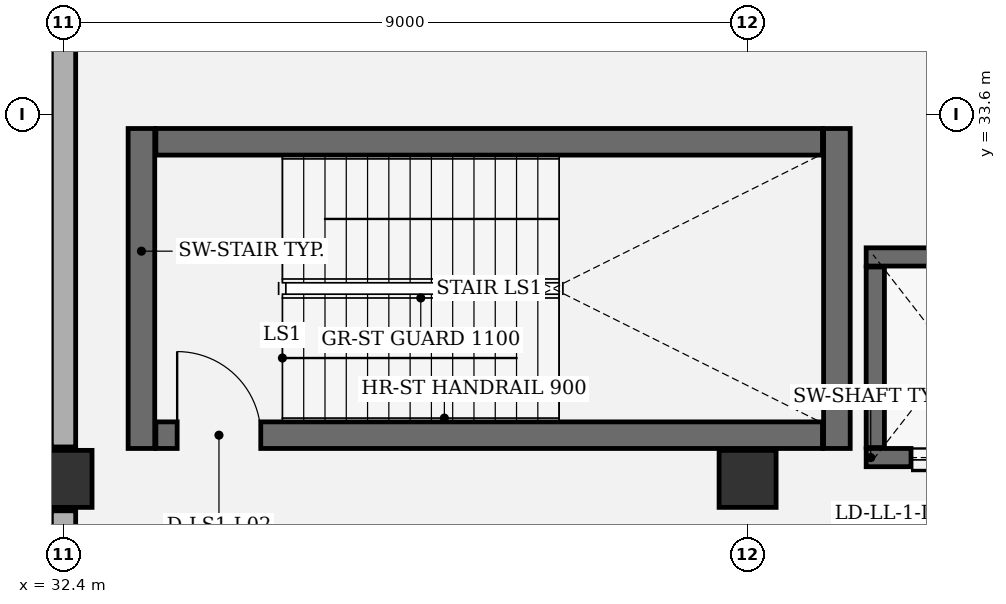
"""IFC4 building model, lengths in metres.
Left out: names, types, materials, properties, quantities, classifications, styles, units other than length and angle.
Written with IfcOpenShell. Run it as: python <this file> out.ifc"""

import sys

from ifc_helpers import new_model, si_unit, direction, frame, frame_2d, origin, origin_2d, place, context, subcontext, project, spatial, rectangle, extrude, element, fill, save


model = new_model("IFC4")
c1 = context("Model", 3, precision=1e-05, world=origin(), true_north=direction((0.0, 1.0)))
c2 = subcontext(c1, "Body", "Model", "MODEL_VIEW")
j1 = project(units=[si_unit("LENGTHUNIT", "METRE"), si_unit("PLANEANGLEUNIT", "RADIAN")], contexts=[c1])
p1 = place(None, origin())
s1 = spatial("IfcSite", under=j1, at=p1, CompositionType="ELEMENT")
p2 = place(p1, origin())
s2 = spatial("IfcBuilding", under=s1, at=p2, CompositionType="ELEMENT")
p3 = place(p2, frame((0.0, 0.0, 12.0)))
s3 = spatial("IfcBuildingStorey", under=s2, at=p3, CompositionType="ELEMENT", Elevation=12.0)
for number, where, z_axis, x_axis in (
    (1, (32.4, 28.8, 0.0), (0.0, 0.0, 1.0), (1.0, 0.0, 0.0)),
    (2, (41.4, 28.8, 0.0), (0.0, 0.0, 1.0), (1.0, 0.0, 0.0)),
):
    element("IfcColumn", number, at=place(p3, frame(where, z_axis=z_axis, x_axis=x_axis)), inside=s3, PredefinedType="COLUMN", context=c2, shape_type="SweptSolid", body=[
        extrude(rectangle(XDim=0.75, YDim=0.75, at=origin_2d()), origin(), (0.0, 0.0, 1.0), 5.0),
    ])
p4 = place(p3, frame((32.4, 19.62, 0.0), z_axis=(0.0, 0.0, 1.0), x_axis=(0.0, 1.0, 0.0)))
e3 = element("IfcWall", 3, at=p4, inside=s3, PredefinedType="SOLIDWALL", context=c2, shape_type="SweptSolid", body=[
    extrude(rectangle(XDim=8.76, YDim=0.32, at=frame_2d((4.38, 0.0))), origin(), (0.0, 0.0, 1.0), 3.937),
])
p5 = place(p3, frame((32.4, 29.22, 0.0), z_axis=(0.0, 0.0, 1.0), x_axis=(0.0, 1.0, 0.0)))
e4 = element("IfcWall", 4, at=p5, inside=s3, PredefinedType="SOLIDWALL", context=c2, shape_type="SweptSolid", body=[
    extrude(rectangle(XDim=8.76, YDim=0.32, at=frame_2d((4.38, 0.0))), origin(), (0.0, 0.0, 1.0), 3.937),
])
for number, where, z_axis, x_axis in (
    (5, (33.425, 33.41, 0.0), (0.0, 0.0, 1.0), (0.0, -1.0, 0.0)),
    (6, (42.575, 29.2, 0.0), (0.0, 0.0, 1.0), (0.0, 1.0, 0.0)),
):
    element("IfcWall", number, at=place(p3, frame(where, z_axis=z_axis, x_axis=x_axis)), inside=s3, PredefinedType="SHEAR", context=c2, shape_type="SweptSolid", body=[
        extrude(rectangle(XDim=4.21, YDim=0.35, at=frame_2d((2.105, 0.0))), origin(), (0.0, 0.0, 1.0), 4.995),
    ])
p6 = place(p3, frame((33.615, 29.375, 0.0), z_axis=(0.0, 0.0, 1.0), x_axis=(1.0, 0.0, 0.0)))
e7 = element("IfcWall", 7, at=p6, inside=s3, PredefinedType="SHEAR", context=c2, shape_type="SweptSolid", body=[
    extrude(rectangle(XDim=8.77, YDim=0.35, at=frame_2d((4.385, 0.0))), origin(), (0.0, 0.0, 1.0), 4.995),
])
p7 = place(p6, frame((0.28, 0.0, 0.0)))
e8 = element("IfcOpeningElement", 8, at=p7, cuts=e7, PredefinedType="OPENING", context=c2, shape_type="SweptSolid", body=[
    extrude(rectangle(XDim=1.1, YDim=2.2, at=frame_2d((0.55, 1.1))), frame((0.0, 0.185, 0.0), z_axis=(0.0, -1.0, 0.0), x_axis=(1.0, 0.0, 0.0)), (0.0, 0.0, 1.0), 0.37),
])
p8 = place(p3, frame((42.385, 33.235, 0.0), z_axis=(0.0, 0.0, 1.0), x_axis=(-1.0, 0.0, 0.0)))
e9 = element("IfcWall", 9, at=p8, inside=s3, PredefinedType="SHEAR", context=c2, shape_type="SweptSolid", body=[
    extrude(rectangle(XDim=8.77, YDim=0.35, at=frame_2d((4.385, 0.0))), origin(), (0.0, 0.0, 1.0), 4.995),
])
p9 = place(p3, frame((45.24, 29.08, 0.0), z_axis=(0.0, 0.0, 1.0), x_axis=(-1.0, 0.0, 0.0)))
e10 = element("IfcWall", 10, at=p9, inside=s3, PredefinedType="SHEAR", context=c2, shape_type="SweptSolid", body=[
    extrude(rectangle(XDim=2.28, YDim=0.24, at=frame_2d((1.14, 0.0))), origin(), (0.0, 0.0, 1.0), 4.74),
])
p10 = place(p9, frame((0.59, 0.0, 0.0)))
e11 = element("IfcOpeningElement", 11, at=p10, cuts=e10, PredefinedType="OPENING", context=c2, shape_type="SweptSolid", body=[
    extrude(rectangle(XDim=1.1, YDim=2.2, at=frame_2d((0.55, 1.1))), frame((0.0, 0.13, 0.0), z_axis=(0.0, -1.0, 0.0), x_axis=(1.0, 0.0, 0.0)), (0.0, 0.0, 1.0), 0.26),
])
p11 = place(p3, frame((42.96, 31.72, 0.0), z_axis=(0.0, 0.0, 1.0), x_axis=(1.0, 0.0, 0.0)))
e12 = element("IfcWall", 12, at=p11, inside=s3, PredefinedType="SHEAR", context=c2, shape_type="SweptSolid", body=[
    extrude(rectangle(XDim=2.28, YDim=0.24, at=frame_2d((1.14, 0.0))), origin(), (0.0, 0.0, 1.0), 4.74),
])
p12 = place(p3, frame((43.08, 29.212, 0.0), z_axis=(0.0, 0.0, 1.0), x_axis=(0.0, 1.0, 0.0)))
e13 = element("IfcWall", 13, at=p12, inside=s3, PredefinedType="SHEAR", context=c2, shape_type="SweptSolid", body=[
    extrude(rectangle(XDim=2.376, YDim=0.24, at=frame_2d((1.188, 0.0))), origin(), (0.0, 0.0, 1.0), 4.74),
])
p13 = place(p7, origin())
e14 = element("IfcDoor", 14, at=p13, inside=s3, OperationType="SINGLE_SWING_LEFT", PredefinedType="DOOR", context=c2, shape_type="SweptSolid", body=[
    extrude(rectangle(XDim=1.1, YDim=2.2, at=frame_2d((0.55, 1.1))), frame((0.0, 0.025, 0.0), z_axis=(0.0, -1.0, 0.0), x_axis=(1.0, 0.0, 0.0)), (0.0, 0.0, 1.0), 0.05),
])
fill(e8, e14)
p14 = place(p10, origin())
e15 = element("IfcDoor", 15, at=p14, inside=s3, OperationType="DOUBLE_DOOR_SLIDING", PredefinedType="DOOR", context=c2, shape_type="SweptSolid", body=[
    extrude(rectangle(XDim=1.1, YDim=2.2, at=frame_2d((0.55, 1.1))), frame((0.0, 0.025, 0.0), z_axis=(0.0, -1.0, 0.0), x_axis=(1.0, 0.0, 0.0)), (0.0, 0.0, 1.0), 0.05),
])
fill(e11, e15)
save(model, sys.argv[1])
